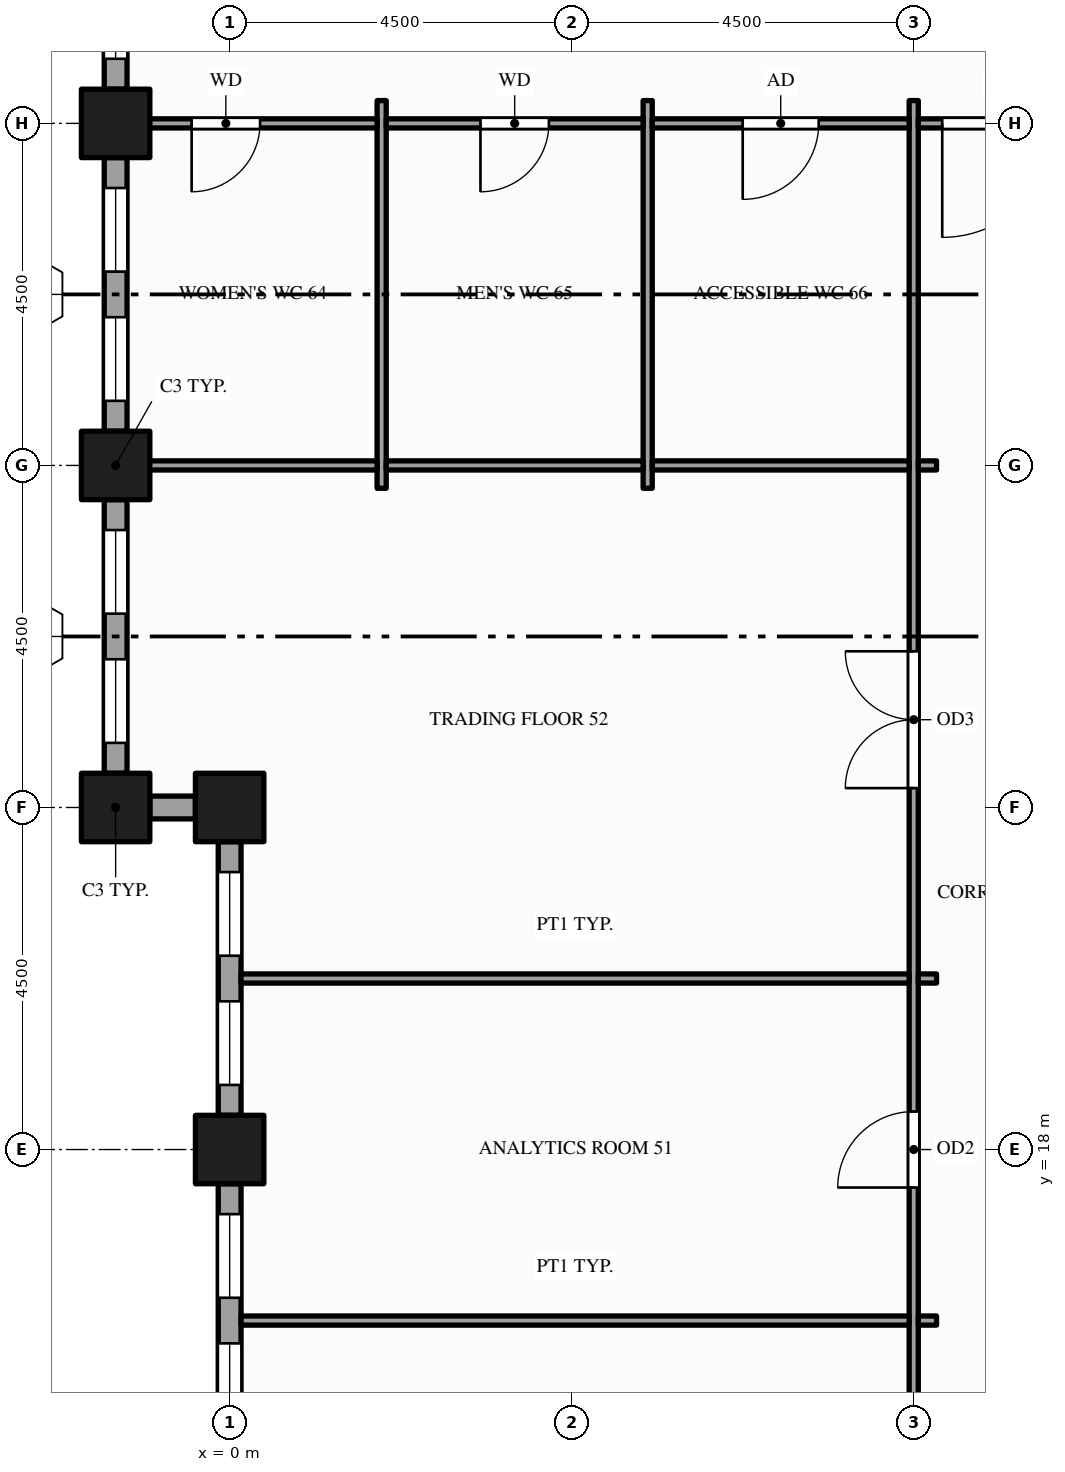
"""IFC4 building model, lengths in metres.
Left out: names, types, materials, properties, quantities, classifications, styles, units other than length and angle.
Written with IfcOpenShell. Run it as: python <this file> out.ifc"""

import sys

from ifc_helpers import new_model, si_unit, direction, frame, frame_2d, origin, origin_2d, place, context, subcontext, project, spatial, rectangle, hollow_rectangle, extrude, element, fill, save


model = new_model("IFC4")
c1 = context("Model", 3, precision=1e-05, world=origin(), true_north=direction((0.0, 1.0)))
c2 = subcontext(c1, "Body", "Model", "MODEL_VIEW")
j1 = project(units=[si_unit("LENGTHUNIT", "METRE"), si_unit("PLANEANGLEUNIT", "RADIAN")], contexts=[c1])
p1 = place(None, origin())
s1 = spatial("IfcSite", under=j1, at=p1, CompositionType="ELEMENT")
p2 = place(p1, origin())
s2 = spatial("IfcBuilding", under=s1, at=p2, CompositionType="ELEMENT")
p3 = place(p2, frame((0.0, 0.0, 147.0)))
s3 = spatial("IfcBuildingStorey", under=s2, at=p3, CompositionType="ELEMENT", Elevation=147.0)
for number, where, z_axis, x_axis in (
    (1, (-1.5, 22.5, -0.15), (0.0, 0.0, 1.0), (1.0, 0.0, 0.0)),
    (2, (-1.5, 27.0, -0.15), (0.0, 0.0, 1.0), (1.0, 0.0, 0.0)),
    (3, (-1.5, 31.5, -0.15), (0.0, 0.0, 1.0), (1.0, 0.0, 0.0)),
    (4, (0.0, 18.0, -0.15), (0.0, 0.0, 1.0), (1.0, 0.0, 0.0)),
    (5, (0.0, 22.5, -0.15), (0.0, 0.0, 1.0), (1.0, 0.0, 0.0)),
):
    element("IfcColumn", number, at=place(p3, frame(where, z_axis=z_axis, x_axis=x_axis)), inside=s3, PredefinedType="COLUMN", context=c2, shape_type="SweptSolid", body=[
        extrude(hollow_rectangle(XDim=0.9, YDim=0.9, WallThickness=0.045, at=origin_2d()), origin(), (0.0, 0.0, 1.0), 4.0),
    ])
p4 = place(p3, frame((-1.5, 35.55, 0.0), z_axis=(0.0, 0.0, 1.0), x_axis=(0.0, -1.0, 0.0)))
e6 = element("IfcWall", 6, at=p4, inside=s3, PredefinedType="STANDARD", context=c2, shape_type="SweptSolid", body=[
    extrude(rectangle(XDim=3.6, YDim=0.3, at=frame_2d((1.8, 0.0))), origin(), (0.0, 0.0, 1.0), 3.149),
])
p5 = place(p4, frame((0.4, 0.0, 0.9)))
e7 = element("IfcOpeningElement", 7, at=p5, cuts=e6, PredefinedType="OPENING", context=c2, shape_type="SweptSolid", body=[
    extrude(rectangle(XDim=1.1, YDim=2.0, at=frame_2d((0.55, 1.0))), frame((0.0, 0.16, 0.0), z_axis=(0.0, -1.0, 0.0), x_axis=(1.0, 0.0, 0.0)), (0.0, 0.0, 1.0), 0.32),
])
p6 = place(p4, frame((2.1, 0.0, 0.9)))
e8 = element("IfcOpeningElement", 8, at=p6, cuts=e6, PredefinedType="OPENING", context=c2, shape_type="SweptSolid", body=[
    extrude(rectangle(XDim=1.1, YDim=2.0, at=frame_2d((0.55, 1.0))), frame((0.0, 0.16, 0.0), z_axis=(0.0, -1.0, 0.0), x_axis=(1.0, 0.0, 0.0)), (0.0, 0.0, 1.0), 0.32),
])
p7 = place(p3, frame((-1.5, 31.05, 0.0), z_axis=(0.0, 0.0, 1.0), x_axis=(0.0, -1.0, 0.0)))
e9 = element("IfcWall", 9, at=p7, inside=s3, PredefinedType="STANDARD", context=c2, shape_type="SweptSolid", body=[
    extrude(rectangle(XDim=3.6, YDim=0.3, at=frame_2d((1.8, 0.0))), origin(), (0.0, 0.0, 1.0), 3.149),
])
p8 = place(p7, frame((0.4, 0.0, 0.9)))
e10 = element("IfcOpeningElement", 10, at=p8, cuts=e9, PredefinedType="OPENING", context=c2, shape_type="SweptSolid", body=[
    extrude(rectangle(XDim=1.1, YDim=2.0, at=frame_2d((0.55, 1.0))), frame((0.0, 0.16, 0.0), z_axis=(0.0, -1.0, 0.0), x_axis=(1.0, 0.0, 0.0)), (0.0, 0.0, 1.0), 0.32),
])
p9 = place(p7, frame((2.1, 0.0, 0.9)))
e11 = element("IfcOpeningElement", 11, at=p9, cuts=e9, PredefinedType="OPENING", context=c2, shape_type="SweptSolid", body=[
    extrude(rectangle(XDim=1.1, YDim=2.0, at=frame_2d((0.55, 1.0))), frame((0.0, 0.16, 0.0), z_axis=(0.0, -1.0, 0.0), x_axis=(1.0, 0.0, 0.0)), (0.0, 0.0, 1.0), 0.32),
])
p10 = place(p3, frame((-1.5, 26.55, 0.0), z_axis=(0.0, 0.0, 1.0), x_axis=(0.0, -1.0, 0.0)))
e12 = element("IfcWall", 12, at=p10, inside=s3, PredefinedType="STANDARD", context=c2, shape_type="SweptSolid", body=[
    extrude(rectangle(XDim=3.6, YDim=0.3, at=frame_2d((1.8, 0.0))), origin(), (0.0, 0.0, 1.0), 3.149),
])
p11 = place(p10, frame((0.4, 0.0, 0.9)))
e13 = element("IfcOpeningElement", 13, at=p11, cuts=e12, PredefinedType="OPENING", context=c2, shape_type="SweptSolid", body=[
    extrude(rectangle(XDim=1.1, YDim=2.0, at=frame_2d((0.55, 1.0))), frame((0.0, 0.16, 0.0), z_axis=(0.0, -1.0, 0.0), x_axis=(1.0, 0.0, 0.0)), (0.0, 0.0, 1.0), 0.32),
])
p12 = place(p10, frame((2.1, 0.0, 0.9)))
e14 = element("IfcOpeningElement", 14, at=p12, cuts=e12, PredefinedType="OPENING", context=c2, shape_type="SweptSolid", body=[
    extrude(rectangle(XDim=1.1, YDim=2.0, at=frame_2d((0.55, 1.0))), frame((0.0, 0.16, 0.0), z_axis=(0.0, -1.0, 0.0), x_axis=(1.0, 0.0, 0.0)), (0.0, 0.0, 1.0), 0.32),
])
p13 = place(p3, frame((-1.05, 22.5, 0.0), z_axis=(0.0, 0.0, 1.0), x_axis=(1.0, 0.0, 0.0)))
e15 = element("IfcWall", 15, at=p13, inside=s3, PredefinedType="STANDARD", context=c2, shape_type="SweptSolid", body=[
    extrude(rectangle(XDim=0.6, YDim=0.3, at=frame_2d((0.3, 0.0))), origin(), (0.0, 0.0, 1.0), 3.149),
])
p14 = place(p3, frame((0.0, 22.05, 0.0), z_axis=(0.0, 0.0, 1.0), x_axis=(0.0, -1.0, 0.0)))
e16 = element("IfcWall", 16, at=p14, inside=s3, PredefinedType="STANDARD", context=c2, shape_type="SweptSolid", body=[
    extrude(rectangle(XDim=3.6, YDim=0.3, at=frame_2d((1.8, 0.0))), origin(), (0.0, 0.0, 1.0), 3.149),
])
p15 = place(p14, frame((0.4, 0.0, 0.9)))
e17 = element("IfcOpeningElement", 17, at=p15, cuts=e16, PredefinedType="OPENING", context=c2, shape_type="SweptSolid", body=[
    extrude(rectangle(XDim=1.1, YDim=2.0, at=frame_2d((0.55, 1.0))), frame((0.0, 0.16, 0.0), z_axis=(0.0, -1.0, 0.0), x_axis=(1.0, 0.0, 0.0)), (0.0, 0.0, 1.0), 0.32),
])
p16 = place(p14, frame((2.1, 0.0, 0.9)))
e18 = element("IfcOpeningElement", 18, at=p16, cuts=e16, PredefinedType="OPENING", context=c2, shape_type="SweptSolid", body=[
    extrude(rectangle(XDim=1.1, YDim=2.0, at=frame_2d((0.55, 1.0))), frame((0.0, 0.16, 0.0), z_axis=(0.0, -1.0, 0.0), x_axis=(1.0, 0.0, 0.0)), (0.0, 0.0, 1.0), 0.32),
])
p17 = place(p3, frame((0.0, 17.55, 0.0), z_axis=(0.0, 0.0, 1.0), x_axis=(0.0, -1.0, 0.0)))
e19 = element("IfcWall", 19, at=p17, inside=s3, PredefinedType="STANDARD", context=c2, shape_type="SweptSolid", body=[
    extrude(rectangle(XDim=3.6, YDim=0.3, at=frame_2d((1.8, 0.0))), origin(), (0.0, 0.0, 1.0), 3.149),
])
p18 = place(p17, frame((0.4, 0.0, 0.9)))
e20 = element("IfcOpeningElement", 20, at=p18, cuts=e19, PredefinedType="OPENING", context=c2, shape_type="SweptSolid", body=[
    extrude(rectangle(XDim=1.1, YDim=2.0, at=frame_2d((0.55, 1.0))), frame((0.0, 0.16, 0.0), z_axis=(0.0, -1.0, 0.0), x_axis=(1.0, 0.0, 0.0)), (0.0, 0.0, 1.0), 0.32),
])
p19 = place(p17, frame((2.1, 0.0, 0.9)))
e21 = element("IfcOpeningElement", 21, at=p19, cuts=e19, PredefinedType="OPENING", context=c2, shape_type="SweptSolid", body=[
    extrude(rectangle(XDim=1.1, YDim=2.0, at=frame_2d((0.55, 1.0))), frame((0.0, 0.16, 0.0), z_axis=(0.0, -1.0, 0.0), x_axis=(1.0, 0.0, 0.0)), (0.0, 0.0, 1.0), 0.32),
])
for number, where, z_axis, x_axis in (
    (22, (2.0, 26.7, 0.0), (0.0, 0.0, 1.0), (0.0, 1.0, 0.0)),
    (23, (5.5, 26.7, 0.0), (0.0, 0.0, 1.0), (0.0, 1.0, 0.0)),
):
    element("IfcWall", number, at=place(p3, frame(where, z_axis=z_axis, x_axis=x_axis)), inside=s3, PredefinedType="PARTITIONING", context=c2, shape_type="SweptSolid", body=[
        extrude(rectangle(XDim=5.1, YDim=0.12, at=frame_2d((2.55, 0.0))), origin(), (0.0, 0.0, 1.0), 3.85),
    ])
p20 = place(p3, frame((9.0, 10.95, 0.0), z_axis=(0.0, 0.0, 1.0), x_axis=(0.0, 1.0, 0.0)))
e24 = element("IfcWall", 24, at=p20, inside=s3, PredefinedType="PARTITIONING", context=c2, shape_type="SweptSolid", body=[
    extrude(rectangle(XDim=20.85, YDim=0.12, at=frame_2d((10.425, 0.0))), origin(), (0.0, 0.0, 1.0), 2.6),
])
p21 = place(p20, frame((2.05, 0.0, 0.0)))
e25 = element("IfcOpeningElement", 25, at=p21, cuts=e24, PredefinedType="OPENING", context=c2, shape_type="SweptSolid", body=[
    extrude(rectangle(XDim=1.0, YDim=2.1, at=frame_2d((0.5, 1.05))), frame((0.0, 0.07, 0.0), z_axis=(0.0, -1.0, 0.0), x_axis=(1.0, 0.0, 0.0)), (0.0, 0.0, 1.0), 0.14),
])
p22 = place(p20, frame((6.55, 0.0, 0.0)))
e26 = element("IfcOpeningElement", 26, at=p22, cuts=e24, PredefinedType="OPENING", context=c2, shape_type="SweptSolid", body=[
    extrude(rectangle(XDim=1.0, YDim=2.1, at=frame_2d((0.5, 1.05))), frame((0.0, 0.07, 0.0), z_axis=(0.0, -1.0, 0.0), x_axis=(1.0, 0.0, 0.0)), (0.0, 0.0, 1.0), 0.14),
])
p23 = place(p20, frame((11.805, 0.0, 0.0)))
e27 = element("IfcOpeningElement", 27, at=p23, cuts=e24, PredefinedType="OPENING", context=c2, shape_type="SweptSolid", body=[
    extrude(rectangle(XDim=1.8, YDim=2.1, at=frame_2d((0.9, 1.05))), frame((0.0, 0.07, 0.0), z_axis=(0.0, -1.0, 0.0), x_axis=(1.0, 0.0, 0.0)), (0.0, 0.0, 1.0), 0.14),
])
p24 = place(p3, frame((0.15, 15.75, 0.0), z_axis=(0.0, 0.0, 1.0), x_axis=(1.0, 0.0, 0.0)))
e28 = element("IfcWall", 28, at=p24, inside=s3, PredefinedType="PARTITIONING", context=c2, shape_type="SweptSolid", body=[
    extrude(rectangle(XDim=8.79, YDim=0.12, at=frame_2d((4.395, 0.0))), origin(), (0.0, 0.0, 1.0), 2.87),
])
p25 = place(p3, frame((9.06, 15.75, 0.0), z_axis=(0.0, 0.0, 1.0), x_axis=(1.0, 0.0, 0.0)))
e29 = element("IfcWall", 29, at=p25, inside=s3, PredefinedType="PARTITIONING", context=c2, shape_type="SweptSolid", body=[
    extrude(rectangle(XDim=0.24, YDim=0.12, at=frame_2d((0.12, 0.0))), origin(), (0.0, 0.0, 1.0), 2.87),
])
p26 = place(p3, frame((0.15, 20.25, 0.0), z_axis=(0.0, 0.0, 1.0), x_axis=(1.0, 0.0, 0.0)))
e30 = element("IfcWall", 30, at=p26, inside=s3, PredefinedType="PARTITIONING", context=c2, shape_type="SweptSolid", body=[
    extrude(rectangle(XDim=8.79, YDim=0.12, at=frame_2d((4.395, 0.0))), origin(), (0.0, 0.0, 1.0), 2.87),
])
p27 = place(p3, frame((9.06, 20.25, 0.0), z_axis=(0.0, 0.0, 1.0), x_axis=(1.0, 0.0, 0.0)))
e31 = element("IfcWall", 31, at=p27, inside=s3, PredefinedType="PARTITIONING", context=c2, shape_type="SweptSolid", body=[
    extrude(rectangle(XDim=0.24, YDim=0.12, at=frame_2d((0.12, 0.0))), origin(), (0.0, 0.0, 1.0), 2.87),
])
p28 = place(p3, frame((-1.35, 27.0, 0.0), z_axis=(0.0, 0.0, 1.0), x_axis=(1.0, 0.0, 0.0)))
e32 = element("IfcWall", 32, at=p28, inside=s3, PredefinedType="PARTITIONING", context=c2, shape_type="SweptSolid", body=[
    extrude(rectangle(XDim=3.29, YDim=0.12, at=frame_2d((1.645, 0.0))), origin(), (0.0, 0.0, 1.0), 2.87),
])
for number, where, z_axis, x_axis in (
    (33, (2.06, 27.0, 0.0), (0.0, 0.0, 1.0), (1.0, 0.0, 0.0)),
    (34, (5.56, 27.0, 0.0), (0.0, 0.0, 1.0), (1.0, 0.0, 0.0)),
):
    element("IfcWall", number, at=place(p3, frame(where, z_axis=z_axis, x_axis=x_axis)), inside=s3, PredefinedType="PARTITIONING", context=c2, shape_type="SweptSolid", body=[
        extrude(rectangle(XDim=3.38, YDim=0.12, at=frame_2d((1.69, 0.0))), origin(), (0.0, 0.0, 1.0), 2.87),
    ])
p29 = place(p3, frame((9.06, 27.0, 0.0), z_axis=(0.0, 0.0, 1.0), x_axis=(1.0, 0.0, 0.0)))
e35 = element("IfcWall", 35, at=p29, inside=s3, PredefinedType="PARTITIONING", context=c2, shape_type="SweptSolid", body=[
    extrude(rectangle(XDim=0.24, YDim=0.12, at=frame_2d((0.12, 0.0))), origin(), (0.0, 0.0, 1.0), 2.87),
])
p30 = place(p3, frame((-1.35, 31.5, 0.0), z_axis=(0.0, 0.0, 1.0), x_axis=(1.0, 0.0, 0.0)))
e36 = element("IfcWall", 36, at=p30, inside=s3, PredefinedType="PARTITIONING", context=c2, shape_type="SweptSolid", body=[
    extrude(rectangle(XDim=3.29, YDim=0.12, at=frame_2d((1.645, 0.0))), origin(), (0.0, 0.0, 1.0), 2.87),
])
p31 = place(p30, frame((0.85, 0.0, 0.0)))
e37 = element("IfcOpeningElement", 37, at=p31, cuts=e36, PredefinedType="OPENING", context=c2, shape_type="SweptSolid", body=[
    extrude(rectangle(XDim=0.9, YDim=2.1, at=frame_2d((0.45, 1.05))), frame((0.0, 0.07, 0.0), z_axis=(0.0, -1.0, 0.0), x_axis=(1.0, 0.0, 0.0)), (0.0, 0.0, 1.0), 0.14),
])
p32 = place(p3, frame((2.06, 31.5, 0.0), z_axis=(0.0, 0.0, 1.0), x_axis=(1.0, 0.0, 0.0)))
e38 = element("IfcWall", 38, at=p32, inside=s3, PredefinedType="PARTITIONING", context=c2, shape_type="SweptSolid", body=[
    extrude(rectangle(XDim=3.38, YDim=0.12, at=frame_2d((1.69, 0.0))), origin(), (0.0, 0.0, 1.0), 2.87),
])
p33 = place(p32, frame((1.24, 0.0, 0.0)))
e39 = element("IfcOpeningElement", 39, at=p33, cuts=e38, PredefinedType="OPENING", context=c2, shape_type="SweptSolid", body=[
    extrude(rectangle(XDim=0.9, YDim=2.1, at=frame_2d((0.45, 1.05))), frame((0.0, 0.07, 0.0), z_axis=(0.0, -1.0, 0.0), x_axis=(1.0, 0.0, 0.0)), (0.0, 0.0, 1.0), 0.14),
])
p34 = place(p3, frame((5.56, 31.5, 0.0), z_axis=(0.0, 0.0, 1.0), x_axis=(1.0, 0.0, 0.0)))
e40 = element("IfcWall", 40, at=p34, inside=s3, PredefinedType="PARTITIONING", context=c2, shape_type="SweptSolid", body=[
    extrude(rectangle(XDim=3.38, YDim=0.12, at=frame_2d((1.69, 0.0))), origin(), (0.0, 0.0, 1.0), 2.87),
])
p35 = place(p34, frame((1.19, 0.0, 0.0)))
e41 = element("IfcOpeningElement", 41, at=p35, cuts=e40, PredefinedType="OPENING", context=c2, shape_type="SweptSolid", body=[
    extrude(rectangle(XDim=1.0, YDim=2.1, at=frame_2d((0.5, 1.05))), frame((0.0, 0.07, 0.0), z_axis=(0.0, -1.0, 0.0), x_axis=(1.0, 0.0, 0.0)), (0.0, 0.0, 1.0), 0.14),
])
p36 = place(p3, frame((9.06, 31.5, 0.0), z_axis=(0.0, 0.0, 1.0), x_axis=(1.0, 0.0, 0.0)))
e42 = element("IfcWall", 42, at=p36, inside=s3, PredefinedType="PARTITIONING", context=c2, shape_type="SweptSolid", body=[
    extrude(rectangle(XDim=2.13, YDim=0.12, at=frame_2d((1.065, 0.0))), origin(), (0.0, 0.0, 1.0), 2.87),
])
p37 = place(p36, frame((0.315, 0.0, 0.0)))
e43 = element("IfcOpeningElement", 43, at=p37, cuts=e42, PredefinedType="OPENING", context=c2, shape_type="SweptSolid", body=[
    extrude(rectangle(XDim=1.5, YDim=2.1, at=frame_2d((0.75, 1.05))), frame((0.0, 0.07, 0.0), z_axis=(0.0, -1.0, 0.0), x_axis=(1.0, 0.0, 0.0)), (0.0, 0.0, 1.0), 0.14),
])
p38 = place(p6, origin())
e44 = element("IfcWindow", 44, at=p38, inside=s3, PartitioningType="SINGLE_PANEL", PredefinedType="WINDOW", context=c2, shape_type="SweptSolid", body=[
    extrude(rectangle(XDim=1.1, YDim=2.0, at=frame_2d((0.55, 1.0))), frame((0.0, 0.03, 0.0), z_axis=(0.0, -1.0, 0.0), x_axis=(1.0, 0.0, 0.0)), (0.0, 0.0, 1.0), 0.06),
])
fill(e8, e44)
p39 = place(p8, origin())
e45 = element("IfcWindow", 45, at=p39, inside=s3, PartitioningType="SINGLE_PANEL", PredefinedType="WINDOW", context=c2, shape_type="SweptSolid", body=[
    extrude(rectangle(XDim=1.1, YDim=2.0, at=frame_2d((0.55, 1.0))), frame((0.0, 0.03, 0.0), z_axis=(0.0, -1.0, 0.0), x_axis=(1.0, 0.0, 0.0)), (0.0, 0.0, 1.0), 0.06),
])
fill(e10, e45)
p40 = place(p9, origin())
e46 = element("IfcWindow", 46, at=p40, inside=s3, PartitioningType="SINGLE_PANEL", PredefinedType="WINDOW", context=c2, shape_type="SweptSolid", body=[
    extrude(rectangle(XDim=1.1, YDim=2.0, at=frame_2d((0.55, 1.0))), frame((0.0, 0.03, 0.0), z_axis=(0.0, -1.0, 0.0), x_axis=(1.0, 0.0, 0.0)), (0.0, 0.0, 1.0), 0.06),
])
fill(e11, e46)
p41 = place(p11, origin())
e47 = element("IfcWindow", 47, at=p41, inside=s3, PartitioningType="SINGLE_PANEL", PredefinedType="WINDOW", context=c2, shape_type="SweptSolid", body=[
    extrude(rectangle(XDim=1.1, YDim=2.0, at=frame_2d((0.55, 1.0))), frame((0.0, 0.03, 0.0), z_axis=(0.0, -1.0, 0.0), x_axis=(1.0, 0.0, 0.0)), (0.0, 0.0, 1.0), 0.06),
])
fill(e13, e47)
p42 = place(p12, origin())
e48 = element("IfcWindow", 48, at=p42, inside=s3, PartitioningType="SINGLE_PANEL", PredefinedType="WINDOW", context=c2, shape_type="SweptSolid", body=[
    extrude(rectangle(XDim=1.1, YDim=2.0, at=frame_2d((0.55, 1.0))), frame((0.0, 0.03, 0.0), z_axis=(0.0, -1.0, 0.0), x_axis=(1.0, 0.0, 0.0)), (0.0, 0.0, 1.0), 0.06),
])
fill(e14, e48)
p43 = place(p15, origin())
e49 = element("IfcWindow", 49, at=p43, inside=s3, PartitioningType="SINGLE_PANEL", PredefinedType="WINDOW", context=c2, shape_type="SweptSolid", body=[
    extrude(rectangle(XDim=1.1, YDim=2.0, at=frame_2d((0.55, 1.0))), frame((0.0, 0.03, 0.0), z_axis=(0.0, -1.0, 0.0), x_axis=(1.0, 0.0, 0.0)), (0.0, 0.0, 1.0), 0.06),
])
fill(e17, e49)
p44 = place(p16, origin())
e50 = element("IfcWindow", 50, at=p44, inside=s3, PartitioningType="SINGLE_PANEL", PredefinedType="WINDOW", context=c2, shape_type="SweptSolid", body=[
    extrude(rectangle(XDim=1.1, YDim=2.0, at=frame_2d((0.55, 1.0))), frame((0.0, 0.03, 0.0), z_axis=(0.0, -1.0, 0.0), x_axis=(1.0, 0.0, 0.0)), (0.0, 0.0, 1.0), 0.06),
])
fill(e18, e50)
p45 = place(p18, origin())
e51 = element("IfcWindow", 51, at=p45, inside=s3, PartitioningType="SINGLE_PANEL", PredefinedType="WINDOW", context=c2, shape_type="SweptSolid", body=[
    extrude(rectangle(XDim=1.1, YDim=2.0, at=frame_2d((0.55, 1.0))), frame((0.0, 0.03, 0.0), z_axis=(0.0, -1.0, 0.0), x_axis=(1.0, 0.0, 0.0)), (0.0, 0.0, 1.0), 0.06),
])
fill(e20, e51)
p46 = place(p19, origin())
e52 = element("IfcWindow", 52, at=p46, inside=s3, PartitioningType="SINGLE_PANEL", PredefinedType="WINDOW", context=c2, shape_type="SweptSolid", body=[
    extrude(rectangle(XDim=1.1, YDim=2.0, at=frame_2d((0.55, 1.0))), frame((0.0, 0.03, 0.0), z_axis=(0.0, -1.0, 0.0), x_axis=(1.0, 0.0, 0.0)), (0.0, 0.0, 1.0), 0.06),
])
fill(e21, e52)
p47 = place(p37, origin())
e53 = element("IfcDoor", 53, at=p47, inside=s3, OperationType="SINGLE_SWING_LEFT", PredefinedType="DOOR", context=c2, shape_type="SweptSolid", body=[
    extrude(rectangle(XDim=1.5, YDim=2.1, at=frame_2d((0.75, 1.05))), frame((0.0, 0.025, 0.0), z_axis=(0.0, -1.0, 0.0), x_axis=(1.0, 0.0, 0.0)), (0.0, 0.0, 1.0), 0.05),
])
fill(e43, e53)
p48 = place(p22, origin())
e54 = element("IfcDoor", 54, at=p48, inside=s3, OperationType="SINGLE_SWING_LEFT", PredefinedType="DOOR", context=c2, shape_type="SweptSolid", body=[
    extrude(rectangle(XDim=1.0, YDim=2.1, at=frame_2d((0.5, 1.05))), frame((0.0, 0.025, 0.0), z_axis=(0.0, -1.0, 0.0), x_axis=(1.0, 0.0, 0.0)), (0.0, 0.0, 1.0), 0.05),
])
fill(e26, e54)
p49 = place(p23, origin())
e55 = element("IfcDoor", 55, at=p49, inside=s3, OperationType="DOUBLE_DOOR_SINGLE_SWING", PredefinedType="DOOR", context=c2, shape_type="SweptSolid", body=[
    extrude(rectangle(XDim=1.8, YDim=2.1, at=frame_2d((0.9, 1.05))), frame((0.0, 0.025, 0.0), z_axis=(0.0, -1.0, 0.0), x_axis=(1.0, 0.0, 0.0)), (0.0, 0.0, 1.0), 0.05),
])
fill(e27, e55)
p50 = place(p31, origin())
e56 = element("IfcDoor", 56, at=p50, inside=s3, OperationType="SINGLE_SWING_LEFT", PredefinedType="DOOR", context=c2, shape_type="SweptSolid", body=[
    extrude(rectangle(XDim=0.9, YDim=2.1, at=frame_2d((0.45, 1.05))), frame((0.0, 0.025, 0.0), z_axis=(0.0, -1.0, 0.0), x_axis=(1.0, 0.0, 0.0)), (0.0, 0.0, 1.0), 0.05),
])
fill(e37, e56)
p51 = place(p33, origin())
e57 = element("IfcDoor", 57, at=p51, inside=s3, OperationType="SINGLE_SWING_LEFT", PredefinedType="DOOR", context=c2, shape_type="SweptSolid", body=[
    extrude(rectangle(XDim=0.9, YDim=2.1, at=frame_2d((0.45, 1.05))), frame((0.0, 0.025, 0.0), z_axis=(0.0, -1.0, 0.0), x_axis=(1.0, 0.0, 0.0)), (0.0, 0.0, 1.0), 0.05),
])
fill(e39, e57)
p52 = place(p35, origin())
e58 = element("IfcDoor", 58, at=p52, inside=s3, OperationType="SINGLE_SWING_LEFT", PredefinedType="DOOR", context=c2, shape_type="SweptSolid", body=[
    extrude(rectangle(XDim=1.0, YDim=2.1, at=frame_2d((0.5, 1.05))), frame((0.0, 0.025, 0.0), z_axis=(0.0, -1.0, 0.0), x_axis=(1.0, 0.0, 0.0)), (0.0, 0.0, 1.0), 0.05),
])
fill(e41, e58)
save(model, sys.argv[1])
